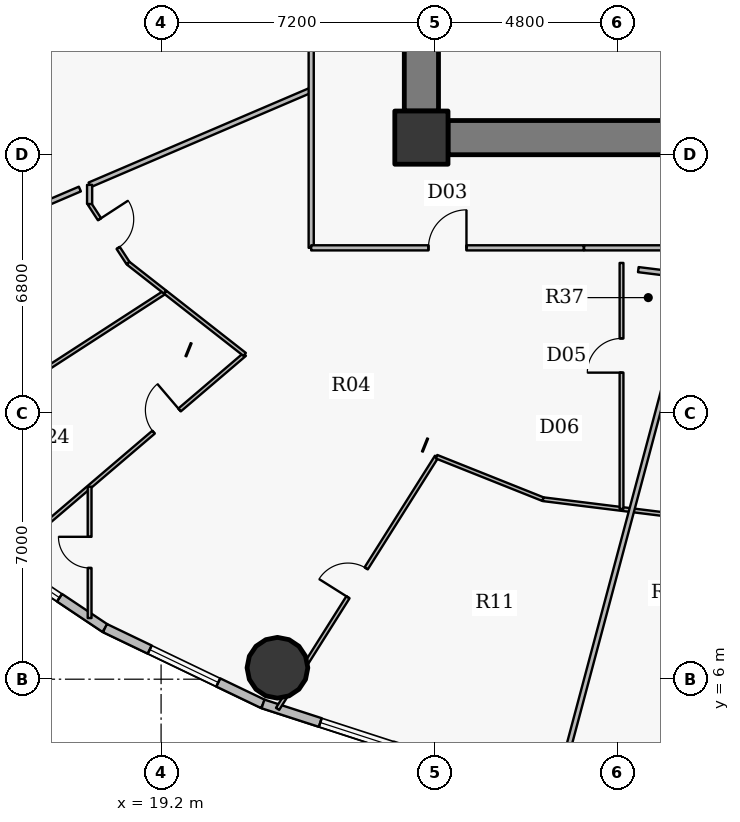
"""IFC4 building model, lengths in metres.
Left out: names, types, materials, properties, quantities, classifications, styles, units other than length and angle.
Written with IfcOpenShell. Run it as: python <this file> out.ifc"""

import sys

from ifc_helpers import new_model, si_unit, direction, frame, frame_2d, origin, origin_2d, place, context, subcontext, project, spatial, rectangle, hollow_circle, extrude, source, transform, mapped, element, fill, save


model = new_model("IFC4")
c1 = context("Model", 3, precision=1e-05, world=origin(), true_north=direction((0.0, 1.0)))
c2 = subcontext(c1, "Body", "Model", "MODEL_VIEW")
j1 = project(units=[si_unit("LENGTHUNIT", "METRE"), si_unit("PLANEANGLEUNIT", "RADIAN")], contexts=[c1])
p1 = place(None, origin())
s1 = spatial("IfcSite", under=j1, at=p1, CompositionType="ELEMENT")
p2 = place(p1, origin())
s2 = spatial("IfcBuilding", under=s1, at=p2, CompositionType="ELEMENT")
p3 = place(p2, frame((0.0, 0.0, 74.4)))
s3 = spatial("IfcBuildingStorey", under=s2, at=p3, CompositionType="ELEMENT", Elevation=74.4)
p4 = place(p3, frame((26.05, 20.25, 0.0), z_axis=(0.0, 0.0, 1.0), x_axis=(1.0, 0.0, 0.0)))
e1 = element("IfcColumn", 1, at=p4, inside=s3, PredefinedType="COLUMN", context=c2, shape_type="SweptSolid", body=[
    extrude(rectangle(XDim=1.4, YDim=1.4, at=origin_2d()), origin(), (0.0, 0.0, 1.0), 4.2),
])
p5 = place(p3, frame((45.25, 20.25, 0.0), z_axis=(0.0, 0.0, 1.0), x_axis=(-1.0, 0.0, 0.0)))
e2 = element("IfcWall", 2, at=p5, inside=s3, PredefinedType="SHEAR", context=c2, shape_type="SweptSolid", body=[
    extrude(rectangle(XDim=18.5, YDim=0.9, at=frame_2d((9.25, 0.0))), origin(), (0.0, 0.0, 1.0), 3.4),
])
p6 = place(p5, frame((10.0, 0.0, 0.0)))
e3 = element("IfcOpeningElement", 3, at=p6, cuts=e2, PredefinedType="OPENING", context=c2, shape_type="SweptSolid", body=[
    extrude(rectangle(XDim=1.15, YDim=2.15, at=origin_2d()), frame((0.575, 0.46, 1.075), z_axis=(0.0, -1.0, 0.0), x_axis=(1.0, 0.0, 0.0)), (0.0, 0.0, 1.0), 0.92),
])
p7 = place(p3, frame((26.05, 20.95, 0.0), z_axis=(0.0, 0.0, 1.0), x_axis=(0.0, 1.0, 0.0)))
e4 = element("IfcWall", 4, at=p7, inside=s3, PredefinedType="SHEAR", context=c2, shape_type="SweptSolid", body=[
    extrude(rectangle(XDim=12.1, YDim=0.9, at=frame_2d((6.05, 0.0))), origin(), (0.0, 0.0, 1.0), 3.4),
])
p8 = place(p7, frame((5.64, 0.0, 0.0)))
e5 = element("IfcOpeningElement", 5, at=p8, cuts=e4, PredefinedType="OPENING", context=c2, shape_type="SweptSolid", body=[
    extrude(rectangle(XDim=0.82, YDim=2.1, at=origin_2d()), frame((0.41, 0.46, 1.05), z_axis=(0.0, -1.0, 0.0), x_axis=(1.0, 0.0, 0.0)), (0.0, 0.0, 1.0), 0.92),
])
p9 = place(p3, frame((22.262, 6.301, 0.0), z_axis=(0.0, 0.0, 1.0), x_axis=(1.0, 0.0, 0.0)))
e6 = element("IfcColumn", 6, at=p9, inside=s3, PredefinedType="COLUMN", context=c2, shape_type="SweptSolid", body=[
    extrude(hollow_circle(Radius=0.8, WallThickness=0.045, at=origin_2d()), origin(), (0.0, 0.0, 1.0), 4.2),
])
p10 = place(p3, frame((17.723, 7.344, 0.0), z_axis=(0.0, 0.0, 1.0), x_axis=(-0.831240982525, 0.555912249343, 0.0)))
e7 = element("IfcWall", 7, at=p10, inside=s3, PredefinedType="SOLIDWALL", context=c2, shape_type="SweptSolid", body=[
    extrude(rectangle(XDim=4.46, YDim=0.24, at=frame_2d((2.23, 0.0))), origin(), (0.0, 0.0, 1.0), 3.95),
])
p11 = place(p10, frame((1.439, 0.0, 0.9)))
e8 = element("IfcOpeningElement", 8, at=p11, cuts=e7, PredefinedType="OPENING", context=c2, shape_type="SweptSolid", body=[
    extrude(rectangle(XDim=1.25, YDim=1.65, at=origin_2d()), frame((0.625, 0.13, 0.825), z_axis=(0.0, -1.0, 0.0), x_axis=(1.0, 0.0, 0.0)), (0.0, 0.0, 1.0), 0.26),
])
p12 = place(p3, frame((21.882, 5.349, 0.0), z_axis=(0.0, 0.0, 1.0), x_axis=(-0.901601503137, 0.432567601123, 0.0)))
e9 = element("IfcWall", 9, at=p12, inside=s3, PredefinedType="SOLIDWALL", context=c2, shape_type="SweptSolid", body=[
    extrude(rectangle(XDim=4.613, YDim=0.24, at=frame_2d((2.306, 0.0))), origin(), (0.0, 0.0, 1.0), 3.95),
])
p13 = place(p12, frame((1.306, 0.0, 0.9)))
e10 = element("IfcOpeningElement", 10, at=p13, cuts=e9, PredefinedType="OPENING", context=c2, shape_type="SweptSolid", body=[
    extrude(rectangle(XDim=2.0, YDim=1.75, at=origin_2d()), frame((1.0, 0.13, 0.875), z_axis=(0.0, -1.0, 0.0), x_axis=(1.0, 0.0, 0.0)), (0.0, 0.0, 1.0), 0.26),
])
p14 = place(p3, frame((26.389, 3.887, 0.0), z_axis=(0.0, 0.0, 1.0), x_axis=(-0.951207699013, 0.308551313946, 0.0)))
e11 = element("IfcWall", 11, at=p14, inside=s3, PredefinedType="SOLIDWALL", context=c2, shape_type="SweptSolid", body=[
    extrude(rectangle(XDim=4.739, YDim=0.24, at=frame_2d((2.369, 0.0))), origin(), (0.0, 0.0, 1.0), 3.95),
])
p15 = place(p14, frame((1.155, 0.0, 0.9)))
e12 = element("IfcOpeningElement", 12, at=p15, cuts=e11, PredefinedType="OPENING", context=c2, shape_type="SweptSolid", body=[
    extrude(rectangle(XDim=2.0, YDim=1.75, at=origin_2d()), frame((1.0, 0.13, 0.875), z_axis=(0.0, -1.0, 0.0), x_axis=(1.0, 0.0, 0.0)), (0.0, 0.0, 1.0), 0.26),
])
p16 = place(p3, frame((8.785, 15.356, 0.0), z_axis=(0.0, 0.0, 1.0), x_axis=(0.919377695517, 0.393375968998, 0.0)))
e13 = element("IfcWall", 13, at=p16, inside=s3, PredefinedType="PARTITIONING", context=c2, shape_type="SweptSolid", body=[
    extrude(rectangle(XDim=9.003, YDim=0.135, at=frame_2d((4.502, 0.0))), origin(), (0.0, 0.0, 1.0), 3.335),
])
p17 = place(p3, frame((12.133, 11.542, 0.0), z_axis=(0.0, 0.0, 1.0), x_axis=(0.839345439493, 0.5435984117, 0.0)))
e14 = element("IfcWall", 14, at=p17, inside=s3, PredefinedType="PARTITIONING", context=c2, shape_type="SweptSolid", body=[
    extrude(rectangle(XDim=8.543, YDim=0.1, at=frame_2d((4.271, 0.0))), origin(), (0.0, 0.0, 1.0), 3.335),
])
p18 = place(p3, frame((15.048, 9.127, 0.0), z_axis=(0.0, 0.0, 1.0), x_axis=(0.760804650013, 0.648980958517, 0.0)))
e15 = element("IfcWall", 15, at=p18, inside=s3, PredefinedType="PARTITIONING", context=c2, shape_type="SweptSolid", body=[
    extrude(rectangle(XDim=8.349, YDim=0.1, at=frame_2d((4.174, 0.0))), origin(), (0.0, 0.0, 1.0), 3.335),
])
p19 = place(p18, frame((5.197, 0.0, 0.0)))
e16 = element("IfcOpeningElement", 16, at=p19, cuts=e15, PredefinedType="OPENING", context=c2, shape_type="SweptSolid", body=[
    extrude(rectangle(XDim=0.9, YDim=2.1, at=origin_2d()), frame((0.45, 0.06, 1.05), z_axis=(0.0, -1.0, 0.0), x_axis=(1.0, 0.0, 0.0)), (0.0, 0.0, 1.0), 0.12),
])
p20 = place(p3, frame((17.319, 7.608, 0.0), z_axis=(0.0, 0.0, 1.0), x_axis=(0.0, 1.0, 0.0)))
e17 = element("IfcWall", 17, at=p20, inside=s3, PredefinedType="PARTITIONING", context=c2, shape_type="SweptSolid", body=[
    extrude(rectangle(XDim=3.457, YDim=0.1, at=frame_2d((1.728, 0.0))), origin(), (0.0, 0.0, 1.0), 3.335),
])
p21 = place(p20, frame((1.318, 0.0, 0.0)))
e18 = element("IfcOpeningElement", 18, at=p21, cuts=e17, PredefinedType="OPENING", context=c2, shape_type="SweptSolid", body=[
    extrude(rectangle(XDim=0.82, YDim=2.1, at=origin_2d()), frame((0.41, 0.06, 1.05), z_axis=(0.0, -1.0, 0.0), x_axis=(1.0, 0.0, 0.0)), (0.0, 0.0, 1.0), 0.12),
])
p22 = place(p3, frame((17.319, 18.503, 0.0), z_axis=(0.0, 0.0, 1.0), x_axis=(0.54537223853, -0.838193964092, 0.0)))
e19 = element("IfcWall", 19, at=p22, inside=s3, PredefinedType="PARTITIONING", context=c2, shape_type="SweptSolid", body=[
    extrude(rectangle(XDim=1.855, YDim=0.1, at=frame_2d((0.927, 0.0))), origin(), (0.0, 0.0, 1.0), 3.95),
])
p23 = place(p22, frame((0.478, 0.0, 0.0)))
e20 = element("IfcOpeningElement", 20, at=p23, cuts=e19, PredefinedType="OPENING", context=c2, shape_type="SweptSolid", body=[
    extrude(rectangle(XDim=0.9, YDim=2.1, at=origin_2d()), frame((0.45, 0.06, 1.05), z_axis=(0.0, -1.0, 0.0), x_axis=(1.0, 0.0, 0.0)), (0.0, 0.0, 1.0), 0.12),
])
p24 = place(p3, frame((17.319, 19.007, 0.0), z_axis=(0.0, 0.0, 1.0), x_axis=(0.919369884618, 0.393394223721, 0.0)))
e21 = element("IfcWall", 21, at=p24, inside=s3, PredefinedType="PARTITIONING", context=c2, shape_type="SweptSolid", body=[
    extrude(rectangle(XDim=6.342, YDim=0.135, at=frame_2d((3.171, 0.0))), origin(), (0.0, 0.0, 1.0), 3.95),
])
p25 = place(p3, frame((18.331, 16.948, 0.0), z_axis=(0.0, 0.0, 1.0), x_axis=(0.787379901086, -0.61646807814, 0.0)))
e22 = element("IfcWall", 22, at=p25, inside=s3, PredefinedType="PARTITIONING", context=c2, shape_type="SweptSolid", body=[
    extrude(rectangle(XDim=1.236, YDim=0.1, at=frame_2d((0.618, 0.0))), origin(), (0.0, 0.0, 1.0), 3.95),
])
p26 = place(p3, frame((19.312, 16.18, 0.0), z_axis=(0.0, 0.0, 1.0), x_axis=(0.787365097885, -0.616486984967, 0.0)))
e23 = element("IfcWall", 23, at=p26, inside=s3, PredefinedType="PARTITIONING", context=c2, shape_type="SweptSolid", body=[
    extrude(rectangle(XDim=2.652, YDim=0.1, at=frame_2d((1.326, 0.0))), origin(), (0.0, 0.0, 1.0), 3.285),
])
p27 = place(p3, frame((22.265, 5.219, 0.0), z_axis=(0.0, 0.0, 1.0), x_axis=(0.53341083449, 0.845856300827, 0.0)))
e24 = element("IfcWall", 24, at=p27, inside=s3, PredefinedType="PARTITIONING", context=c2, shape_type="SweptSolid", body=[
    extrude(rectangle(XDim=7.844, YDim=0.1, at=frame_2d((3.922, 0.0))), origin(), (0.0, 0.0, 1.0), 3.335),
])
p28 = place(p27, frame((3.472, 0.0, 0.0)))
e25 = element("IfcOpeningElement", 25, at=p28, cuts=e24, PredefinedType="OPENING", context=c2, shape_type="SweptSolid", body=[
    extrude(rectangle(XDim=0.9, YDim=2.1, at=origin_2d()), frame((0.45, 0.06, 1.05), z_axis=(0.0, -1.0, 0.0), x_axis=(1.0, 0.0, 0.0)), (0.0, 0.0, 1.0), 0.12),
])
p29 = place(p3, frame((23.15, 17.35, 0.0), z_axis=(0.0, 0.0, 1.0), x_axis=(0.0, 1.0, 0.0)))
e26 = element("IfcWall", 26, at=p29, inside=s3, PredefinedType="PARTITIONING", context=c2, shape_type="SweptSolid", body=[
    extrude(rectangle(XDim=8.729, YDim=0.135, at=frame_2d((4.365, 0.0))), origin(), (0.0, 0.0, 1.0), 3.285),
])
p30 = place(p29, frame((5.921, 0.0, 0.0)))
e27 = element("IfcOpeningElement", 27, at=p30, cuts=e26, PredefinedType="OPENING", context=c2, shape_type="SweptSolid", body=[
    extrude(rectangle(XDim=1.0, YDim=2.15, at=origin_2d()), frame((0.5, 0.078, 1.075), z_axis=(0.0, -1.0, 0.0), x_axis=(1.0, 0.0, 0.0)), (0.0, 0.0, 1.0), 0.155),
])
p31 = place(p3, frame((23.15, 17.35, 0.0), z_axis=(0.0, 0.0, 1.0), x_axis=(1.0, 0.0, 0.0)))
e28 = element("IfcWall", 28, at=p31, inside=s3, PredefinedType="PARTITIONING", context=c2, shape_type="SweptSolid", body=[
    extrude(rectangle(XDim=7.171, YDim=0.135, at=frame_2d((3.586, 0.0))), origin(), (0.0, 0.0, 1.0), 3.285),
])
p32 = place(p31, frame((3.086, 0.0, 0.0)))
e29 = element("IfcOpeningElement", 29, at=p32, cuts=e28, PredefinedType="OPENING", context=c2, shape_type="SweptSolid", body=[
    extrude(rectangle(XDim=1.0, YDim=2.15, at=origin_2d()), frame((0.5, 0.078, 1.075), z_axis=(0.0, -1.0, 0.0), x_axis=(1.0, 0.0, 0.0)), (0.0, 0.0, 1.0), 0.155),
])
p33 = place(p3, frame((26.449, 11.854, 0.0), z_axis=(0.0, 0.0, 1.0), x_axis=(0.928822359266, -0.370525336417, 0.0)))
e30 = element("IfcWall", 30, at=p33, inside=s3, PredefinedType="PARTITIONING", context=c2, shape_type="SweptSolid", body=[
    extrude(rectangle(XDim=3.016, YDim=0.1, at=frame_2d((1.508, 0.0))), origin(), (0.0, 0.0, 1.0), 3.95),
])
p34 = place(p3, frame((29.251, 10.736, 0.0), z_axis=(0.0, 0.0, 1.0), x_axis=(0.992394520877, -0.123097989151, 0.0)))
e31 = element("IfcWall", 31, at=p34, inside=s3, PredefinedType="PARTITIONING", context=c2, shape_type="SweptSolid", body=[
    extrude(rectangle(XDim=6.801, YDim=0.1, at=frame_2d((3.4, 0.0))), origin(), (0.0, 0.0, 1.0), 3.285),
])
p35 = place(p3, frame((29.669, 3.265, 0.0), z_axis=(0.0, 0.0, 1.0), x_axis=(0.257716621334, 0.96622054578, 0.0)))
e32 = element("IfcWall", 32, at=p35, inside=s3, PredefinedType="PARTITIONING", context=c2, shape_type="SweptSolid", body=[
    extrude(rectangle(XDim=13.796, YDim=0.135, at=frame_2d((6.898, 0.0))), origin(), (0.0, 0.0, 1.0), 3.335),
])
p36 = place(p3, frame((31.316, 10.48, 0.0), z_axis=(0.0, 0.0, 1.0), x_axis=(0.0, 1.0, 0.0)))
e33 = element("IfcWall", 33, at=p36, inside=s3, PredefinedType="PARTITIONING", context=c2, shape_type="SweptSolid", body=[
    extrude(rectangle(XDim=6.473, YDim=0.1, at=frame_2d((3.237, 0.0))), origin(), (0.0, 0.0, 1.0), 3.95),
])
p37 = place(p36, frame((3.587, 0.0, 0.0)))
e34 = element("IfcOpeningElement", 34, at=p37, cuts=e33, PredefinedType="OPENING", context=c2, shape_type="SweptSolid", body=[
    extrude(rectangle(XDim=0.9, YDim=2.1, at=origin_2d()), frame((0.45, 0.06, 1.05), z_axis=(0.0, -1.0, 0.0), x_axis=(1.0, 0.0, 0.0)), (0.0, 0.0, 1.0), 0.12),
])
p38 = place(p3, frame((36.389, 17.35, 0.0), z_axis=(0.0, 0.0, 1.0), x_axis=(-1.0, 0.0, 0.0)))
e35 = element("IfcWall", 35, at=p38, inside=s3, PredefinedType="PARTITIONING", context=c2, shape_type="SweptSolid", body=[
    extrude(rectangle(XDim=6.057, YDim=0.135, at=frame_2d((3.029, 0.0))), origin(), (0.0, 0.0, 1.0), 3.285),
])
p39 = place(p3, frame((25.6, 20.94, 0.0), z_axis=(0.0, 0.0, 1.0), x_axis=(0.0, -1.0, 0.0)))
e36 = element("IfcWall", 36, at=p39, inside=s3, PredefinedType="PARTITIONING", context=c2, shape_type="SweptSolid", body=[
    extrude(rectangle(XDim=1.14, YDim=0.135, at=frame_2d((0.57, 0.0))), origin(), (0.0, 0.0, 1.0), 3.95),
])
p40 = place(p3, frame((25.907, 19.8, 0.0), z_axis=(0.0, 0.0, 1.0), x_axis=(1.0, 0.0, 0.0)))
e37 = element("IfcWall", 37, at=p40, inside=s3, PredefinedType="PARTITIONING", context=c2, shape_type="SweptSolid", body=[
    extrude(rectangle(XDim=0.833, YDim=0.135, at=frame_2d((0.416, 0.0))), origin(), (0.0, 0.0, 1.0), 3.285),
])
p41 = place(p3, frame((17.319, 18.503, 0.0), z_axis=(0.0, 0.0, 1.0), x_axis=(0.0, 1.0, 0.0)))
e38 = element("IfcWall", 38, at=p41, inside=s3, PredefinedType="PARTITIONING", context=c2, shape_type="SweptSolid", body=[
    extrude(rectangle(XDim=0.504, YDim=0.135, at=frame_2d((0.252, 0.0))), origin(), (0.0, 0.0, 1.0), 3.95),
])
p42 = place(p3, frame((31.758, 16.777, 0.0), z_axis=(0.0, 0.0, 1.0), x_axis=(0.992411483091, -0.122961165536, 0.0)))
e39 = element("IfcWall", 39, at=p42, inside=s3, PredefinedType="PARTITIONING", context=c2, shape_type="SweptSolid", body=[
    extrude(rectangle(XDim=1.148, YDim=0.135, at=frame_2d((0.574, 0.0))), origin(), (0.0, 0.0, 1.0), 3.95),
])
m1 = source(origin(), c2, "Body", "SweptSolid", [
    extrude(rectangle(XDim=1.25, YDim=1.65, at=origin_2d()), frame((0.625, 0.03, 0.825), z_axis=(0.0, -1.0, 0.0), x_axis=(1.0, 0.0, 0.0)), (0.0, 0.0, 1.0), 0.06),
])
p43 = place(p11, origin())
e40 = element("IfcWindow", 40, at=p43, inside=s3, PartitioningType="SINGLE_PANEL", PredefinedType="WINDOW", context=c2, shape_type="MappedRepresentation", body=[
    mapped(m1, transform((0.0, 0.0, 0.0), x_axis=(1.0, 0.0, 0.0), y_axis=(0.0, 1.0, 0.0), z_axis=(0.0, 0.0, 1.0), scale=1.0)),
])
fill(e8, e40)
m2 = source(origin(), c2, "Body", "SweptSolid", [
    extrude(rectangle(XDim=2.0, YDim=1.75, at=origin_2d()), frame((1.0, 0.03, 0.875), z_axis=(0.0, -1.0, 0.0), x_axis=(1.0, 0.0, 0.0)), (0.0, 0.0, 1.0), 0.06),
])
p44 = place(p13, origin())
e41 = element("IfcWindow", 41, at=p44, inside=s3, PartitioningType="DOUBLE_PANEL_VERTICAL", PredefinedType="WINDOW", context=c2, shape_type="MappedRepresentation", body=[
    mapped(m2, transform((0.0, 0.0, 0.0), x_axis=(1.0, 0.0, 0.0), y_axis=(0.0, 1.0, 0.0), z_axis=(0.0, 0.0, 1.0), scale=1.0)),
])
fill(e10, e41)
p45 = place(p15, origin())
e42 = element("IfcWindow", 42, at=p45, inside=s3, PartitioningType="DOUBLE_PANEL_VERTICAL", PredefinedType="WINDOW", context=c2, shape_type="MappedRepresentation", body=[
    mapped(m2, transform((0.0, 0.0, 0.0), x_axis=(1.0, 0.0, 0.0), y_axis=(0.0, 1.0, 0.0), z_axis=(0.0, 0.0, 1.0), scale=1.0)),
])
fill(e12, e42)
m3 = source(origin(), c2, "Body", "SweptSolid", [
    extrude(rectangle(XDim=1.0, YDim=2.15, at=origin_2d()), frame((0.5, 0.025, 1.075), z_axis=(0.0, -1.0, 0.0), x_axis=(1.0, 0.0, 0.0)), (0.0, 0.0, 1.0), 0.05),
])
p46 = place(p32, origin())
e43 = element("IfcDoor", 43, at=p46, inside=s3, OperationType="SINGLE_SWING_RIGHT", PredefinedType="DOOR", context=c2, shape_type="MappedRepresentation", body=[
    mapped(m3, transform((0.0, 0.0, 0.0), x_axis=(1.0, 0.0, 0.0), y_axis=(0.0, 1.0, 0.0), z_axis=(0.0, 0.0, 1.0), scale=1.0)),
])
fill(e29, e43)
m4 = source(origin(), c2, "Body", "SweptSolid", [
    extrude(rectangle(XDim=0.9, YDim=2.1, at=origin_2d()), frame((0.45, 0.025, 1.05), z_axis=(0.0, -1.0, 0.0), x_axis=(1.0, 0.0, 0.0)), (0.0, 0.0, 1.0), 0.05),
])
p47 = place(p23, origin())
e44 = element("IfcDoor", 44, at=p47, inside=s3, OperationType="SINGLE_SWING_LEFT", PredefinedType="DOOR", context=c2, shape_type="MappedRepresentation", body=[
    mapped(m4, transform((0.0, 0.0, 0.0), x_axis=(1.0, 0.0, 0.0), y_axis=(0.0, 1.0, 0.0), z_axis=(0.0, 0.0, 1.0), scale=1.0)),
])
fill(e20, e44)
p48 = place(p19, origin())
e45 = element("IfcDoor", 45, at=p48, inside=s3, OperationType="SINGLE_SWING_RIGHT", PredefinedType="DOOR", context=c2, shape_type="MappedRepresentation", body=[
    mapped(m4, transform((0.0, 0.0, 0.0), x_axis=(1.0, 0.0, 0.0), y_axis=(0.0, 1.0, 0.0), z_axis=(0.0, 0.0, 1.0), scale=1.0)),
])
fill(e16, e45)
p49 = place(p28, origin())
e46 = element("IfcDoor", 46, at=p49, inside=s3, OperationType="SINGLE_SWING_LEFT", PredefinedType="DOOR", context=c2, shape_type="MappedRepresentation", body=[
    mapped(m4, transform((0.0, 0.0, 0.0), x_axis=(1.0, 0.0, 0.0), y_axis=(0.0, 1.0, 0.0), z_axis=(0.0, 0.0, 1.0), scale=1.0)),
])
fill(e25, e46)
m5 = source(origin(), c2, "Body", "SweptSolid", [
    extrude(rectangle(XDim=0.82, YDim=2.1, at=origin_2d()), frame((0.41, 0.025, 1.05), z_axis=(0.0, -1.0, 0.0), x_axis=(1.0, 0.0, 0.0)), (0.0, 0.0, 1.0), 0.05),
])
p50 = place(p21, origin())
e47 = element("IfcDoor", 47, at=p50, inside=s3, OperationType="SINGLE_SWING_RIGHT", PredefinedType="DOOR", context=c2, shape_type="MappedRepresentation", body=[
    mapped(m5, transform((0.0, 0.0, 0.0), x_axis=(1.0, 0.0, 0.0), y_axis=(0.0, 1.0, 0.0), z_axis=(0.0, 0.0, 1.0), scale=1.0)),
])
fill(e18, e47)
p51 = place(p37, origin())
e48 = element("IfcDoor", 48, at=p51, inside=s3, OperationType="SINGLE_SWING_LEFT", PredefinedType="DOOR", context=c2, shape_type="MappedRepresentation", body=[
    mapped(m4, transform((0.0, 0.0, 0.0), x_axis=(1.0, 0.0, 0.0), y_axis=(0.0, 1.0, 0.0), z_axis=(0.0, 0.0, 1.0), scale=1.0)),
])
fill(e34, e48)
save(model, sys.argv[1])
